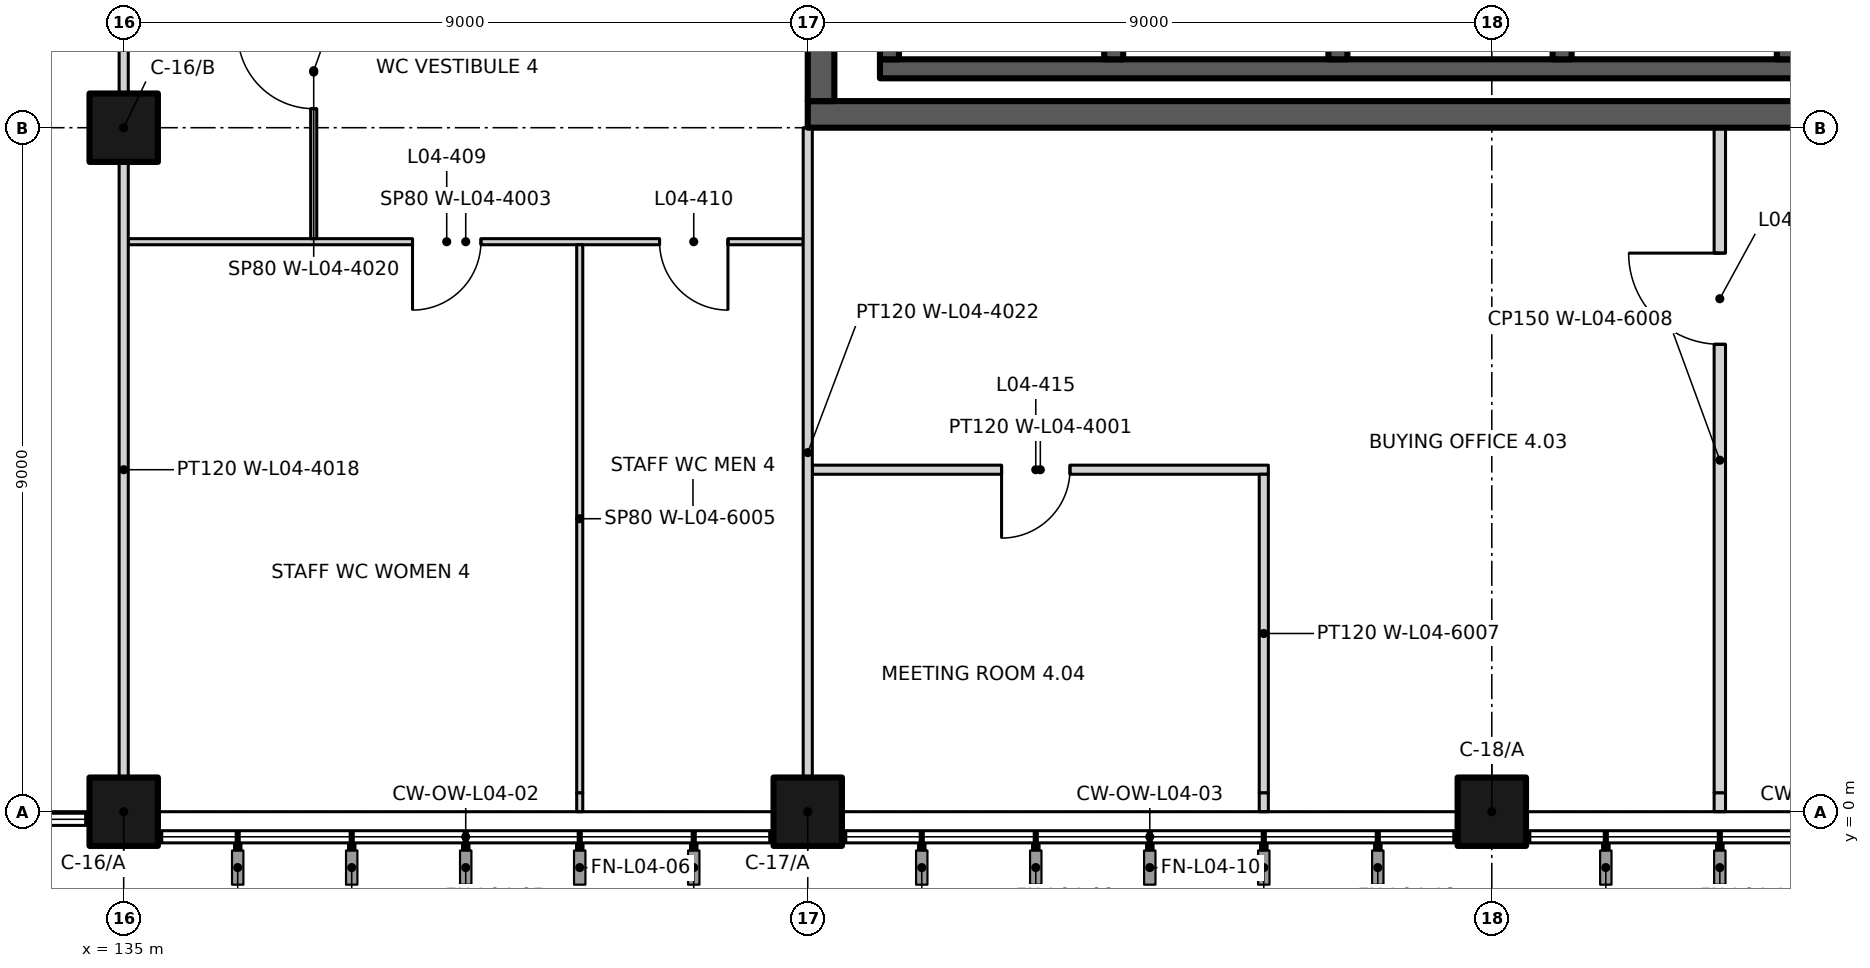
"""IFC4 building model, lengths in metres.
Left out: names, types, materials, properties, quantities, classifications, styles, units other than length and angle.
Written with IfcOpenShell. Run it as: python <this file> out.ifc"""

import sys

from ifc_helpers import new_model, si_unit, direction, frame, frame_2d, origin, origin_2d, place, context, subcontext, project, spatial, rectangle, extrude, element, fill, save


model = new_model("IFC4")
c1 = context("Model", 3, precision=1e-05, world=origin(), true_north=direction((0.0, 1.0)))
c2 = subcontext(c1, "Body", "Model", "MODEL_VIEW")
j1 = project(units=[si_unit("LENGTHUNIT", "METRE"), si_unit("PLANEANGLEUNIT", "RADIAN")], contexts=[c1])
p1 = place(None, origin())
s1 = spatial("IfcSite", under=j1, at=p1, CompositionType="ELEMENT")
p2 = place(p1, origin())
s2 = spatial("IfcBuilding", under=s1, at=p2, CompositionType="ELEMENT")
p3 = place(p2, frame((0.0, 0.0, 19.5)))
s3 = spatial("IfcBuildingStorey", under=s2, at=p3, CompositionType="ELEMENT", Elevation=19.5)
for number, where, z_axis, x_axis in (
    (1, (135.0, 0.0, 0.0), (0.0, 0.0, 1.0), (1.0, 0.0, 0.0)),
    (2, (144.0, 0.0, 0.0), (0.0, 0.0, 1.0), (1.0, 0.0, 0.0)),
    (3, (153.0, 0.0, 0.0), (0.0, 0.0, 1.0), (1.0, 0.0, 0.0)),
    (4, (135.0, 9.0, 0.0), (0.0, 0.0, 1.0), (1.0, 0.0, 0.0)),
):
    element("IfcColumn", number, at=place(p3, frame(where, z_axis=z_axis, x_axis=x_axis)), inside=s3, PredefinedType="COLUMN", context=c2, shape_type="SweptSolid", body=[
        extrude(rectangle(XDim=0.9, YDim=0.9, at=origin_2d()), origin(), (0.0, 0.0, 1.0), 4.5),
    ])
p4 = place(p3, frame((144.95, 9.775, 0.0), z_axis=(0.0, 0.0, 1.0), x_axis=(1.0, 0.0, 0.0)))
e5 = element("IfcWall", 5, at=p4, inside=s3, PredefinedType="SHEAR", context=c2, shape_type="SweptSolid", body=[
    extrude(rectangle(XDim=12.05, YDim=0.25, at=frame_2d((6.025, 0.0))), origin(), (0.0, 0.0, 1.0), 4.5),
])
for number, where, z_axis, x_axis in (
    (6, (145.075, 9.9, 0.0), (0.0, 0.0, 1.0), (0.0, 1.0, 0.0)),
    (7, (148.025, 9.9, 0.0), (0.0, 0.0, 1.0), (0.0, 1.0, 0.0)),
    (8, (150.975, 9.9, 0.0), (0.0, 0.0, 1.0), (0.0, 1.0, 0.0)),
    (9, (153.925, 9.9, 0.0), (0.0, 0.0, 1.0), (0.0, 1.0, 0.0)),
    (10, (156.875, 9.9, 0.0), (0.0, 0.0, 1.0), (0.0, 1.0, 0.0)),
):
    element("IfcWall", number, at=place(p3, frame(where, z_axis=z_axis, x_axis=x_axis)), inside=s3, PredefinedType="SHEAR", context=c2, shape_type="SweptSolid", body=[
        extrude(rectangle(XDim=2.7, YDim=0.25, at=frame_2d((1.35, 0.0))), origin(), (0.0, 0.0, 1.0), 4.5),
    ])
p5 = place(p3, frame((144.06, 4.5, 0.0), z_axis=(0.0, 0.0, 1.0), x_axis=(1.0, 0.0, 0.0)))
e11 = element("IfcWall", 11, at=p5, inside=s3, PredefinedType="PARTITIONING", context=c2, shape_type="SweptSolid", body=[
    extrude(rectangle(XDim=6.0, YDim=0.12, at=frame_2d((3.0, 0.0))), origin(), (0.0, 0.0, 1.0), 4.2),
])
p6 = place(p5, frame((3.39, 0.0, 0.0), z_axis=(0.0, 0.0, 1.0), x_axis=(-1.0, 0.0, 0.0)))
e12 = element("IfcOpeningElement", 12, at=p6, cuts=e11, PredefinedType="OPENING", context=c2, shape_type="SweptSolid", body=[
    extrude(rectangle(XDim=0.9, YDim=2.1, at=frame_2d((0.45, 1.05))), frame((0.0, 0.07, 0.0), z_axis=(0.0, -1.0, 0.0), x_axis=(1.0, 0.0, 0.0)), (0.0, 0.0, 1.0), 0.14),
])
p7 = place(p3, frame((135.06, 7.5, 0.0), z_axis=(0.0, 0.0, 1.0), x_axis=(1.0, 0.0, 0.0)))
e13 = element("IfcWall", 13, at=p7, inside=s3, PredefinedType="PARTITIONING", context=c2, shape_type="SweptSolid", body=[
    extrude(rectangle(XDim=8.88, YDim=0.08, at=frame_2d((4.44, 0.0))), origin(), (0.0, 0.0, 1.0), 4.2),
])
p8 = place(p7, frame((4.64, 0.0, 0.0), z_axis=(0.0, 0.0, 1.0), x_axis=(-1.0, 0.0, 0.0)))
e14 = element("IfcOpeningElement", 14, at=p8, cuts=e13, PredefinedType="OPENING", context=c2, shape_type="SweptSolid", body=[
    extrude(rectangle(XDim=0.9, YDim=2.1, at=frame_2d((0.45, 1.05))), frame((0.0, 0.05, 0.0), z_axis=(0.0, -1.0, 0.0), x_axis=(1.0, 0.0, 0.0)), (0.0, 0.0, 1.0), 0.1),
])
p9 = place(p7, frame((7.89, 0.0, 0.0), z_axis=(0.0, 0.0, 1.0), x_axis=(-1.0, 0.0, 0.0)))
e15 = element("IfcOpeningElement", 15, at=p9, cuts=e13, PredefinedType="OPENING", context=c2, shape_type="SweptSolid", body=[
    extrude(rectangle(XDim=0.9, YDim=2.1, at=frame_2d((0.45, 1.05))), frame((0.0, 0.05, 0.0), z_axis=(0.0, -1.0, 0.0), x_axis=(1.0, 0.0, 0.0)), (0.0, 0.0, 1.0), 0.1),
])
p10 = place(p3, frame((144.0, 9.175, 0.0), z_axis=(0.0, 0.0, 1.0), x_axis=(1.0, 0.0, 0.0)))
e16 = element("IfcWall", 16, at=p10, inside=s3, PredefinedType="SHEAR", context=c2, shape_type="SweptSolid", body=[
    extrude(rectangle(XDim=18.0, YDim=0.35, at=frame_2d((9.0, 0.0))), origin(), (0.0, 0.0, 1.0), 4.2),
])
p11 = place(p10, frame((16.463, 0.0, 0.0), z_axis=(0.0, 0.0, 1.0), x_axis=(-1.0, 0.0, 0.0)))
e17 = element("IfcOpeningElement", 17, at=p11, cuts=e16, PredefinedType="OPENING", context=c2, shape_type="SweptSolid", body=[
    extrude(rectangle(XDim=2.1, YDim=2.4, at=frame_2d((1.05, 1.2))), frame((0.0, 0.185, 0.0), z_axis=(0.0, -1.0, 0.0), x_axis=(1.0, 0.0, 0.0)), (0.0, 0.0, 1.0), 0.37),
])
p12 = place(p3, frame((135.0, 0.45, 0.0), z_axis=(0.0, 0.0, 1.0), x_axis=(0.0, 1.0, 0.0)))
e18 = element("IfcWall", 18, at=p12, inside=s3, PredefinedType="PARTITIONING", context=c2, shape_type="SweptSolid", body=[
    extrude(rectangle(XDim=8.1, YDim=0.12, at=frame_2d((4.05, 0.0))), origin(), (0.0, 0.0, 1.0), 4.2),
])
p13 = place(p3, frame((135.0, 9.45, 0.0), z_axis=(0.0, 0.0, 1.0), x_axis=(0.0, 1.0, 0.0)))
e19 = element("IfcWall", 19, at=p13, inside=s3, PredefinedType="PARTITIONING", context=c2, shape_type="SweptSolid", body=[
    extrude(rectangle(XDim=2.475, YDim=0.12, at=frame_2d((1.238, 0.0))), origin(), (0.0, 0.0, 1.0), 4.2),
])
p14 = place(p3, frame((137.5, 7.54, 0.0), z_axis=(0.0, 0.0, 1.0), x_axis=(0.0, 1.0, 0.0)))
e20 = element("IfcWall", 20, at=p14, inside=s3, PredefinedType="PARTITIONING", context=c2, shape_type="SweptSolid", body=[
    extrude(rectangle(XDim=4.385, YDim=0.08, at=frame_2d((2.192, 0.0))), origin(), (0.0, 0.0, 1.0), 4.2),
])
p15 = place(p14, frame((1.71, 0.0, 0.0)))
e21 = element("IfcOpeningElement", 21, at=p15, cuts=e20, PredefinedType="OPENING", context=c2, shape_type="SweptSolid", body=[
    extrude(rectangle(XDim=1.0, YDim=2.1, at=frame_2d((0.5, 1.05))), frame((0.0, 0.05, 0.0), z_axis=(0.0, -1.0, 0.0), x_axis=(1.0, 0.0, 0.0)), (0.0, 0.0, 1.0), 0.1),
])
p16 = place(p3, frame((141.0, 0.0, 0.0), z_axis=(0.0, 0.0, 1.0), x_axis=(0.0, 1.0, 0.0)))
e22 = element("IfcWall", 22, at=p16, inside=s3, PredefinedType="PARTITIONING", context=c2, shape_type="SweptSolid", body=[
    extrude(rectangle(XDim=0.25, YDim=0.08, at=frame_2d((0.125, 0.0))), origin(), (0.0, 0.0, 1.0), 3.6),
])
p17 = place(p3, frame((141.0, 0.25, 0.0), z_axis=(0.0, 0.0, 1.0), x_axis=(0.0, 1.0, 0.0)))
e23 = element("IfcWall", 23, at=p17, inside=s3, PredefinedType="PARTITIONING", context=c2, shape_type="SweptSolid", body=[
    extrude(rectangle(XDim=7.21, YDim=0.08, at=frame_2d((3.605, 0.0))), origin(), (0.0, 0.0, 1.0), 4.2),
])
p18 = place(p3, frame((144.0, 0.45, 0.0), z_axis=(0.0, 0.0, 1.0), x_axis=(0.0, 1.0, 0.0)))
e24 = element("IfcWall", 24, at=p18, inside=s3, PredefinedType="PARTITIONING", context=c2, shape_type="SweptSolid", body=[
    extrude(rectangle(XDim=8.55, YDim=0.12, at=frame_2d((4.275, 0.0))), origin(), (0.0, 0.0, 1.0), 4.2),
])
p19 = place(p3, frame((144.175, 9.35, 0.0), z_axis=(0.0, 0.0, 1.0), x_axis=(0.0, 1.0, 0.0)))
e25 = element("IfcWall", 25, at=p19, inside=s3, PredefinedType="SHEAR", context=c2, shape_type="SweptSolid", body=[
    extrude(rectangle(XDim=17.4, YDim=0.35, at=frame_2d((8.7, 0.0))), origin(), (0.0, 0.0, 1.0), 4.2),
])
p20 = place(p19, frame((3.75, 0.0, 0.0)))
e26 = element("IfcOpeningElement", 26, at=p20, cuts=e25, PredefinedType="OPENING", context=c2, shape_type="SweptSolid", body=[
    extrude(rectangle(XDim=1.6, YDim=2.4, at=frame_2d((0.8, 1.2))), frame((0.0, 0.185, 0.0), z_axis=(0.0, -1.0, 0.0), x_axis=(1.0, 0.0, 0.0)), (0.0, 0.0, 1.0), 0.37),
])
p21 = place(p3, frame((150.0, 0.0, 0.0), z_axis=(0.0, 0.0, 1.0), x_axis=(0.0, 1.0, 0.0)))
e27 = element("IfcWall", 27, at=p21, inside=s3, PredefinedType="PARTITIONING", context=c2, shape_type="SweptSolid", body=[
    extrude(rectangle(XDim=0.25, YDim=0.12, at=frame_2d((0.125, 0.0))), origin(), (0.0, 0.0, 1.0), 3.6),
])
p22 = place(p3, frame((150.0, 0.25, 0.0), z_axis=(0.0, 0.0, 1.0), x_axis=(0.0, 1.0, 0.0)))
e28 = element("IfcWall", 28, at=p22, inside=s3, PredefinedType="PARTITIONING", context=c2, shape_type="SweptSolid", body=[
    extrude(rectangle(XDim=4.19, YDim=0.12, at=frame_2d((2.095, 0.0))), origin(), (0.0, 0.0, 1.0), 4.2),
])
p23 = place(p3, frame((156.0, 0.0, 0.0), z_axis=(0.0, 0.0, 1.0), x_axis=(0.0, 1.0, 0.0)))
e29 = element("IfcWall", 29, at=p23, inside=s3, PredefinedType="PARTITIONING", context=c2, shape_type="SweptSolid", body=[
    extrude(rectangle(XDim=0.25, YDim=0.15, at=frame_2d((0.125, 0.0))), origin(), (0.0, 0.0, 1.0), 3.6),
])
p24 = place(p3, frame((156.0, 0.25, 0.0), z_axis=(0.0, 0.0, 1.0), x_axis=(0.0, 1.0, 0.0)))
e30 = element("IfcWall", 30, at=p24, inside=s3, PredefinedType="PARTITIONING", context=c2, shape_type="SweptSolid", body=[
    extrude(rectangle(XDim=8.75, YDim=0.15, at=frame_2d((4.375, 0.0))), origin(), (0.0, 0.0, 1.0), 4.2),
])
p25 = place(p24, frame((5.9, 0.0, 0.0)))
e31 = element("IfcOpeningElement", 31, at=p25, cuts=e30, PredefinedType="OPENING", context=c2, shape_type="SweptSolid", body=[
    extrude(rectangle(XDim=1.2, YDim=2.1, at=frame_2d((0.6, 1.05))), frame((0.0, 0.085, 0.0), z_axis=(0.0, -1.0, 0.0), x_axis=(1.0, 0.0, 0.0)), (0.0, 0.0, 1.0), 0.17),
])
p26 = place(p15, origin())
e32 = element("IfcDoor", 32, at=p26, inside=s3, OperationType="SINGLE_SWING_RIGHT", PredefinedType="DOOR", context=c2, shape_type="SweptSolid", body=[
    extrude(rectangle(XDim=1.0, YDim=2.1, at=frame_2d((0.5, 1.05))), frame((0.0, 0.025, 0.0), z_axis=(0.0, -1.0, 0.0), x_axis=(1.0, 0.0, 0.0)), (0.0, 0.0, 1.0), 0.05),
])
fill(e21, e32)
p27 = place(p8, origin())
e33 = element("IfcDoor", 33, at=p27, inside=s3, OperationType="SINGLE_SWING_RIGHT", PredefinedType="DOOR", context=c2, shape_type="SweptSolid", body=[
    extrude(rectangle(XDim=0.9, YDim=2.1, at=frame_2d((0.45, 1.05))), frame((0.0, 0.025, 0.0), z_axis=(0.0, -1.0, 0.0), x_axis=(1.0, 0.0, 0.0)), (0.0, 0.0, 1.0), 0.05),
])
fill(e14, e33)
p28 = place(p9, origin())
e34 = element("IfcDoor", 34, at=p28, inside=s3, OperationType="SINGLE_SWING_LEFT", PredefinedType="DOOR", context=c2, shape_type="SweptSolid", body=[
    extrude(rectangle(XDim=0.9, YDim=2.1, at=frame_2d((0.45, 1.05))), frame((0.0, 0.025, 0.0), z_axis=(0.0, -1.0, 0.0), x_axis=(1.0, 0.0, 0.0)), (0.0, 0.0, 1.0), 0.05),
])
fill(e15, e34)
p29 = place(p25, origin())
e35 = element("IfcDoor", 35, at=p29, inside=s3, OperationType="SINGLE_SWING_RIGHT", PredefinedType="DOOR", context=c2, shape_type="SweptSolid", body=[
    extrude(rectangle(XDim=1.2, YDim=2.1, at=frame_2d((0.6, 1.05))), frame((0.0, 0.025, 0.0), z_axis=(0.0, -1.0, 0.0), x_axis=(1.0, 0.0, 0.0)), (0.0, 0.0, 1.0), 0.05),
])
fill(e31, e35)
p30 = place(p6, origin())
e36 = element("IfcDoor", 36, at=p30, inside=s3, OperationType="SINGLE_SWING_RIGHT", PredefinedType="DOOR", context=c2, shape_type="SweptSolid", body=[
    extrude(rectangle(XDim=0.9, YDim=2.1, at=frame_2d((0.45, 1.05))), frame((0.0, 0.025, 0.0), z_axis=(0.0, -1.0, 0.0), x_axis=(1.0, 0.0, 0.0)), (0.0, 0.0, 1.0), 0.05),
])
fill(e12, e36)
save(model, sys.argv[1])
